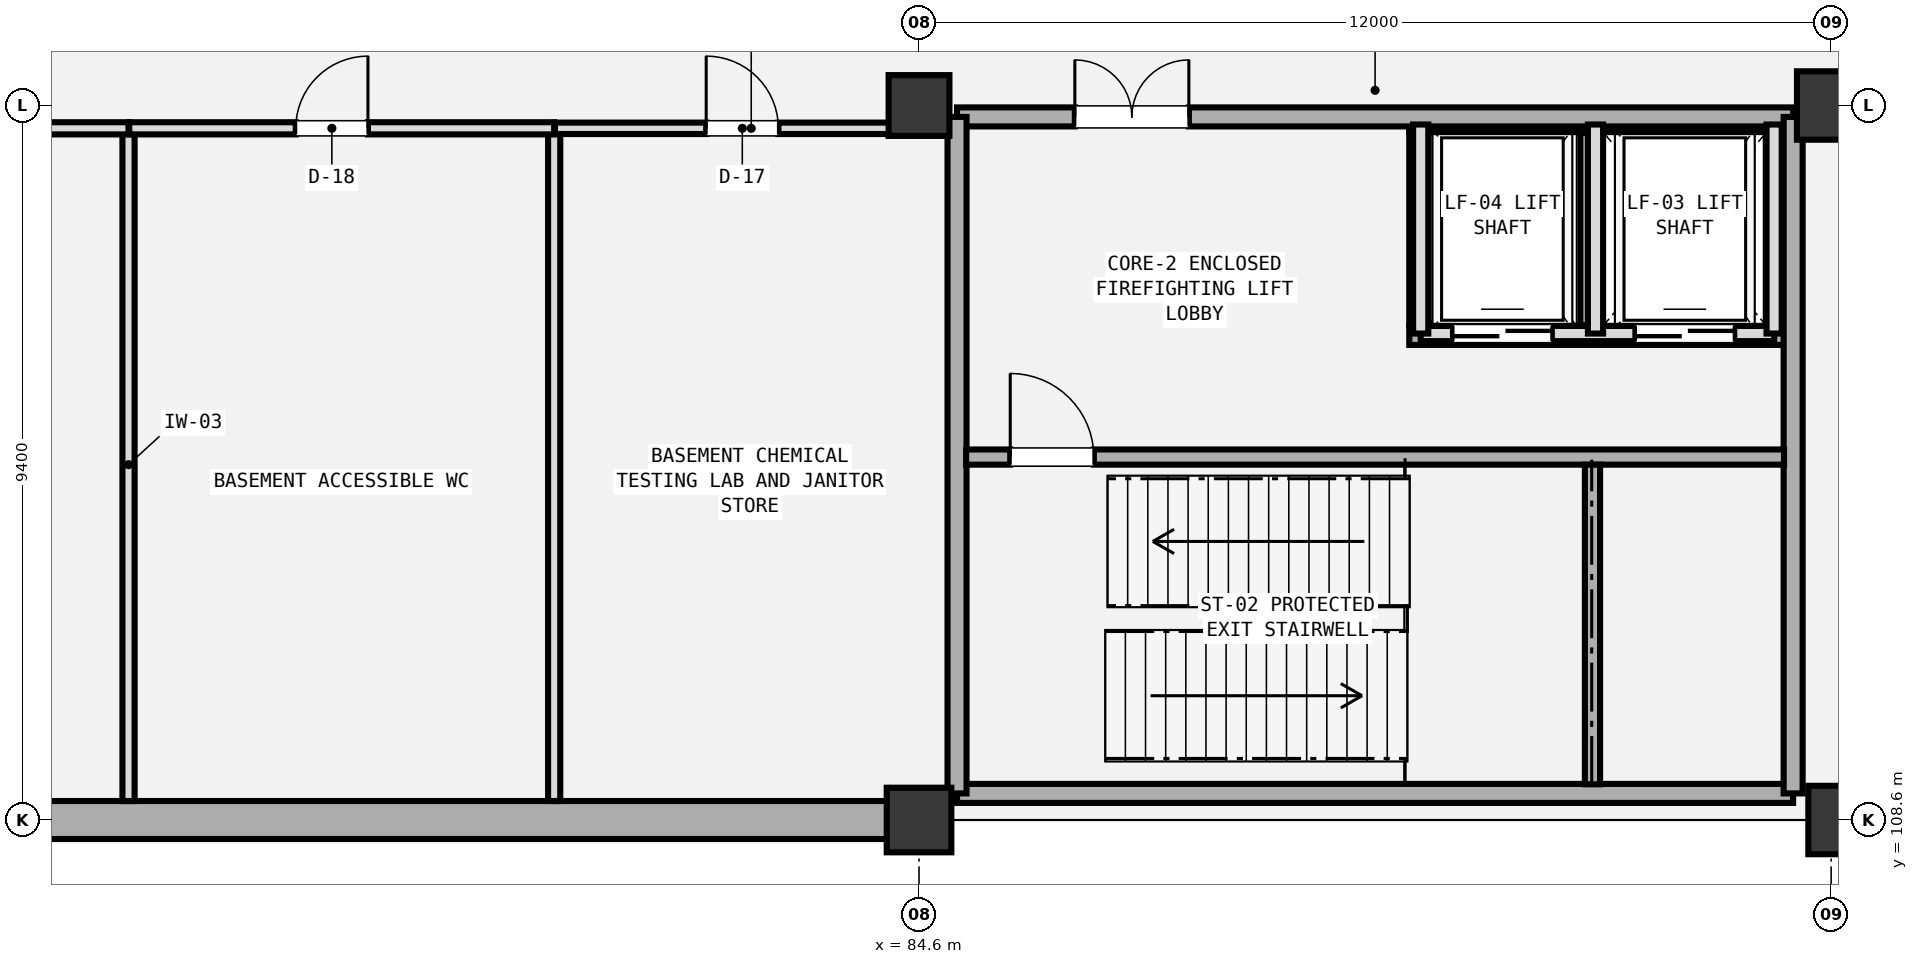
"""IFC4 building model, lengths in metres.
Left out: names, types, materials, properties, quantities, classifications, styles, units other than length and angle.
Written with IfcOpenShell. Run it as: python <this file> out.ifc"""

import sys

from ifc_helpers import new_model, si_unit, direction, frame, frame_2d, origin, origin_2d, place, context, subcontext, project, spatial, rectangle, extrude, element, fill, save


model = new_model("IFC4")
c1 = context("Model", 3, precision=1e-05, world=origin(), true_north=direction((0.0, 1.0)))
c2 = subcontext(c1, "Body", "Model", "MODEL_VIEW")
j1 = project(units=[si_unit("LENGTHUNIT", "METRE"), si_unit("PLANEANGLEUNIT", "RADIAN")], contexts=[c1])
p1 = place(None, origin())
s1 = spatial("IfcSite", under=j1, at=p1, CompositionType="ELEMENT")
p2 = place(p1, origin())
s2 = spatial("IfcBuilding", under=s1, at=p2, CompositionType="ELEMENT")
p3 = place(p2, frame((0.0, 0.0, -5.4)))
s3 = spatial("IfcBuildingStorey", under=s2, at=p3, CompositionType="ELEMENT", Elevation=-5.4)
for number, where, z_axis, x_axis in (
    (1, (91.05, 114.975, -1.6), (0.0, 0.0, 1.0), (1.0, 0.0, 0.0)),
    (2, (91.05, 117.775, -1.6), (0.0, 0.0, 1.0), (1.0, 0.0, 0.0)),
):
    element("IfcWall", number, at=place(p3, frame(where, z_axis=z_axis, x_axis=x_axis)), inside=s3, PredefinedType="SHEAR", context=c2, shape_type="SweptSolid", body=[
        extrude(rectangle(XDim=4.93, YDim=0.25, at=frame_2d((2.465, 0.0))), origin(), (0.0, 0.0, 1.0), 1.05),
    ])
for number, where, z_axis, x_axis in (
    (3, (91.175, 115.11, -1.6), (0.0, 0.0, 1.0), (0.0, 1.0, 0.0)),
    (4, (95.865, 115.11, -1.6), (0.0, 0.0, 1.0), (0.0, 1.0, 0.0)),
    (5, (93.425, 115.11, -1.6), (0.0, 0.0, 1.0), (0.0, 1.0, 0.0)),
):
    element("IfcWall", number, at=place(p3, frame(where, z_axis=z_axis, x_axis=x_axis)), inside=s3, PredefinedType="SHEAR", context=c2, shape_type="SweptSolid", body=[
        extrude(rectangle(XDim=2.53, YDim=0.25, at=frame_2d((1.265, 0.0))), origin(), (0.0, 0.0, 1.0), 1.05),
    ])
p4 = place(p3, frame((60.6, 108.6, 0.0), z_axis=(0.0, 0.0, 1.0), x_axis=(1.0, 0.0, 0.0)))
e6 = element("IfcWall", 6, at=p4, inside=s3, PredefinedType="USERDEFINED", context=c2, shape_type="SweptSolid", body=[
    extrude(rectangle(XDim=24.2, YDim=0.5, at=frame_2d((12.1, 0.0))), origin(), (0.0, 0.0, 1.0), 4.98),
])
p5 = place(p3, frame((96.4, 108.6, 0.0), z_axis=(0.0, 0.0, 1.0), x_axis=(1.0, 0.0, 0.0)))
e7 = element("IfcWall", 7, at=p5, inside=s3, PredefinedType="USERDEFINED", context=c2, shape_type="SweptSolid", body=[
    extrude(rectangle(XDim=59.6, YDim=0.5, at=frame_2d((29.8, 0.0))), origin(), (0.0, 0.0, 1.0), 4.98),
])
p6 = place(p3, frame((84.6, 108.6, -0.55), z_axis=(0.0, 0.0, 1.0), x_axis=(1.0, 0.0, 0.0)))
e8 = element("IfcColumn", 8, at=p6, inside=s3, PredefinedType="COLUMN", context=c2, shape_type="SweptSolid", body=[
    extrude(rectangle(XDim=0.85, YDim=0.85, at=origin_2d()), origin(), (0.0, 0.0, 1.0), 5.95),
])
p7 = place(p3, frame((84.6, 118.0, -0.55), z_axis=(0.0, 0.0, 1.0), x_axis=(1.0, 0.0, 0.0)))
e9 = element("IfcColumn", 9, at=p7, inside=s3, PredefinedType="COLUMN", context=c2, shape_type="SweptSolid", body=[
    extrude(rectangle(XDim=0.8, YDim=0.8, at=origin_2d()), origin(), (0.0, 0.0, 1.0), 5.95),
])
p8 = place(p3, frame((96.6, 108.6, -0.55), z_axis=(0.0, 0.0, 1.0), x_axis=(1.0, 0.0, 0.0)))
e10 = element("IfcColumn", 10, at=p8, inside=s3, PredefinedType="COLUMN", context=c2, shape_type="SweptSolid", body=[
    extrude(rectangle(XDim=0.6, YDim=0.9, at=origin_2d()), origin(), (0.0, 0.0, 1.0), 5.95),
])
p9 = place(p3, frame((96.6, 118.0, -0.55), z_axis=(0.0, 0.0, 1.0), x_axis=(1.0, 0.0, 0.0)))
e11 = element("IfcColumn", 11, at=p9, inside=s3, PredefinedType="COLUMN", context=c2, shape_type="SweptSolid", body=[
    extrude(rectangle(XDim=0.9, YDim=0.9, at=origin_2d()), origin(), (0.0, 0.0, 1.0), 5.95),
])
p10 = place(p3, frame((85.1, 108.95, -0.15), z_axis=(0.0, 0.0, 1.0), x_axis=(1.0, 0.0, 0.0)))
e12 = element("IfcWall", 12, at=p10, inside=s3, PredefinedType="SHEAR", context=c2, shape_type="SweptSolid", body=[
    extrude(rectangle(XDim=11.0, YDim=0.25, at=frame_2d((5.5, 0.0))), origin(), (0.0, 0.0, 1.0), 5.13),
])
p11 = place(p3, frame((85.1, 117.85, -0.15), z_axis=(0.0, 0.0, 1.0), x_axis=(1.0, 0.0, 0.0)))
e13 = element("IfcWall", 13, at=p11, inside=s3, PredefinedType="SHEAR", context=c2, shape_type="SweptSolid", body=[
    extrude(rectangle(XDim=11.0, YDim=0.25, at=frame_2d((5.5, 0.0))), origin(), (0.0, 0.0, 1.0), 5.13),
])
p12 = place(p11, frame((1.55, 0.0, 0.15)))
e14 = element("IfcOpeningElement", 14, at=p12, cuts=e13, PredefinedType="OPENING", context=c2, shape_type="SweptSolid", body=[
    extrude(rectangle(XDim=1.5, YDim=2.2, at=frame_2d((0.75, 1.1))), frame((0.0, 0.135, 0.0), z_axis=(0.0, -1.0, 0.0), x_axis=(1.0, 0.0, 0.0)), (0.0, 0.0, 1.0), 0.27),
])
for number, where, z_axis, x_axis in (
    (15, (85.1, 108.95, -0.15), (0.0, 0.0, 1.0), (0.0, 1.0, 0.0)),
    (16, (96.1, 108.95, -0.15), (0.0, 0.0, 1.0), (0.0, 1.0, 0.0)),
):
    element("IfcWall", number, at=place(p3, frame(where, z_axis=z_axis, x_axis=x_axis)), inside=s3, PredefinedType="SHEAR", context=c2, shape_type="SweptSolid", body=[
        extrude(rectangle(XDim=8.9, YDim=0.25, at=frame_2d((4.45, 0.0))), origin(), (0.0, 0.0, 1.0), 5.13),
    ])
p13 = place(p3, frame((85.22, 113.375, -0.15), z_axis=(0.0, 0.0, 1.0), x_axis=(1.0, 0.0, 0.0)))
e17 = element("IfcWall", 17, at=p13, inside=s3, PredefinedType="SHEAR", context=c2, shape_type="SweptSolid", body=[
    extrude(rectangle(XDim=10.76, YDim=0.2, at=frame_2d((5.38, 0.0))), origin(), (0.0, 0.0, 1.0), 5.13),
])
p14 = place(p13, frame((0.58, 0.0, 0.15)))
e18 = element("IfcOpeningElement", 18, at=p14, cuts=e17, PredefinedType="OPENING", context=c2, shape_type="SweptSolid", body=[
    extrude(rectangle(XDim=1.1, YDim=2.2, at=frame_2d((0.55, 1.1))), frame((0.0, 0.11, 0.0), z_axis=(0.0, -1.0, 0.0), x_axis=(1.0, 0.0, 0.0)), (0.0, 0.0, 1.0), 0.22),
])
p15 = place(p3, frame((93.46, 109.07, -0.15), z_axis=(0.0, 0.0, 1.0), x_axis=(0.0, 1.0, 0.0)))
e19 = element("IfcWall", 19, at=p15, inside=s3, PredefinedType="SHEAR", context=c2, shape_type="SweptSolid", body=[
    extrude(rectangle(XDim=4.205, YDim=0.2, at=frame_2d((2.103, 0.0))), origin(), (0.0, 0.0, 1.0), 5.13),
])
p16 = place(p3, frame((91.2, 115.0, -0.15), z_axis=(0.0, 0.0, 1.0), x_axis=(1.0, 0.0, 0.0)))
e20 = element("IfcWall", 20, at=p16, inside=s3, PredefinedType="SOLIDWALL", context=c2, shape_type="SweptSolid", body=[
    extrude(rectangle(XDim=4.65, YDim=0.2, at=frame_2d((2.325, 0.0))), origin(), (0.0, 0.0, 1.0), 4.93),
])
p17 = place(p16, frame((2.825, 0.0, 0.15)))
e21 = element("IfcOpeningElement", 21, at=p17, cuts=e20, PredefinedType="OPENING", context=c2, shape_type="SweptSolid", body=[
    extrude(rectangle(XDim=1.3, YDim=2.3, at=frame_2d((0.65, 1.15))), frame((0.0, 0.11, 0.0), z_axis=(0.0, -1.0, 0.0), x_axis=(1.0, 0.0, 0.0)), (0.0, 0.0, 1.0), 0.22),
])
p18 = place(p16, frame((0.425, 0.0, 0.15)))
e22 = element("IfcOpeningElement", 22, at=p18, cuts=e20, PredefinedType="OPENING", context=c2, shape_type="SweptSolid", body=[
    extrude(rectangle(XDim=1.3, YDim=2.3, at=frame_2d((0.65, 1.15))), frame((0.0, 0.11, 0.0), z_axis=(0.0, -1.0, 0.0), x_axis=(1.0, 0.0, 0.0)), (0.0, 0.0, 1.0), 0.22),
])
for number, where, z_axis, x_axis in (
    (23, (93.5, 115.0, -0.15), (0.0, 0.0, 1.0), (0.0, 1.0, 0.0)),
    (24, (95.85, 115.0, -0.15), (0.0, 0.0, 1.0), (0.0, 1.0, 0.0)),
    (25, (91.2, 115.0, -0.15), (0.0, 0.0, 1.0), (0.0, 1.0, 0.0)),
):
    element("IfcWall", number, at=place(p3, frame(where, z_axis=z_axis, x_axis=x_axis)), inside=s3, PredefinedType="SOLIDWALL", context=c2, shape_type="SweptSolid", body=[
        extrude(rectangle(XDim=2.75, YDim=0.2, at=frame_2d((1.375, 0.0))), origin(), (0.0, 0.0, 1.0), 5.13),
    ])
p19 = place(p3, frame((74.2, 108.85, 0.0), z_axis=(0.0, 0.0, 1.0), x_axis=(0.0, 1.0, 0.0)))
e26 = element("IfcWall", 26, at=p19, inside=s3, PredefinedType="PLUMBINGWALL", context=c2, shape_type="SweptSolid", body=[
    extrude(rectangle(XDim=8.85, YDim=0.16, at=frame_2d((4.425, 0.0))), origin(), (0.0, 0.0, 1.0), 3.8),
])
p20 = place(p3, frame((67.21, 117.7, 0.0), z_axis=(0.0, 0.0, 1.0), x_axis=(1.0, 0.0, 0.0)))
e27 = element("IfcWall", 27, at=p20, inside=s3, PredefinedType="PLUMBINGWALL", context=c2, shape_type="SweptSolid", body=[
    extrude(rectangle(XDim=6.99, YDim=0.16, at=frame_2d((3.495, 0.0))), origin(), (0.0, 0.0, 1.0), 3.8),
])
p21 = place(p20, frame((2.79, 0.0, 0.0)))
e28 = element("IfcOpeningElement", 28, at=p21, cuts=e27, PredefinedType="OPENING", context=c2, shape_type="SweptSolid", body=[
    extrude(rectangle(XDim=0.95, YDim=2.15, at=frame_2d((0.475, 1.075))), frame((0.0, 0.09, 0.0), z_axis=(0.0, -1.0, 0.0), x_axis=(1.0, 0.0, 0.0)), (0.0, 0.0, 1.0), 0.18),
])
p22 = place(p3, frame((79.8, 108.85, 0.0), z_axis=(0.0, 0.0, 1.0), x_axis=(0.0, 1.0, 0.0)))
e29 = element("IfcWall", 29, at=p22, inside=s3, PredefinedType="PLUMBINGWALL", context=c2, shape_type="SweptSolid", body=[
    extrude(rectangle(XDim=8.85, YDim=0.16, at=frame_2d((4.425, 0.0))), origin(), (0.0, 0.0, 1.0), 3.8),
])
p23 = place(p3, frame((74.21, 117.7, 0.0), z_axis=(0.0, 0.0, 1.0), x_axis=(1.0, 0.0, 0.0)))
e30 = element("IfcWall", 30, at=p23, inside=s3, PredefinedType="PLUMBINGWALL", context=c2, shape_type="SweptSolid", body=[
    extrude(rectangle(XDim=5.59, YDim=0.16, at=frame_2d((2.795, 0.0))), origin(), (0.0, 0.0, 1.0), 3.8),
])
p24 = place(p23, frame((2.19, 0.0, 0.0)))
e31 = element("IfcOpeningElement", 31, at=p24, cuts=e30, PredefinedType="OPENING", context=c2, shape_type="SweptSolid", body=[
    extrude(rectangle(XDim=0.95, YDim=2.15, at=frame_2d((0.475, 1.075))), frame((0.0, 0.09, 0.0), z_axis=(0.0, -1.0, 0.0), x_axis=(1.0, 0.0, 0.0)), (0.0, 0.0, 1.0), 0.18),
])
p25 = place(p3, frame((79.81, 117.7, 0.0), z_axis=(0.0, 0.0, 1.0), x_axis=(1.0, 0.0, 0.0)))
e32 = element("IfcWall", 32, at=p25, inside=s3, PredefinedType="PARTITIONING", context=c2, shape_type="SweptSolid", body=[
    extrude(rectangle(XDim=5.165, YDim=0.15, at=frame_2d((2.583, 0.0))), origin(), (0.0, 0.0, 1.0), 3.8),
])
p26 = place(p25, frame((1.99, 0.0, 0.0)))
e33 = element("IfcOpeningElement", 33, at=p26, cuts=e32, PredefinedType="OPENING", context=c2, shape_type="SweptSolid", body=[
    extrude(rectangle(XDim=0.95, YDim=2.2, at=frame_2d((0.475, 1.1))), frame((0.0, 0.085, 0.0), z_axis=(0.0, -1.0, 0.0), x_axis=(1.0, 0.0, 0.0)), (0.0, 0.0, 1.0), 0.17),
])
p27 = place(p12, origin())
e34 = element("IfcDoor", 34, at=p27, inside=s3, OperationType="DOUBLE_DOOR_SINGLE_SWING", PredefinedType="DOOR", context=c2, shape_type="SweptSolid", body=[
    extrude(rectangle(XDim=1.5, YDim=2.2, at=frame_2d((0.75, 1.1))), frame((0.0, 0.025, 0.0), z_axis=(0.0, -1.0, 0.0), x_axis=(1.0, 0.0, 0.0)), (0.0, 0.0, 1.0), 0.05),
])
fill(e14, e34)
p28 = place(p14, origin())
e35 = element("IfcDoor", 35, at=p28, inside=s3, OperationType="SINGLE_SWING_LEFT", PredefinedType="DOOR", context=c2, shape_type="SweptSolid", body=[
    extrude(rectangle(XDim=1.1, YDim=2.2, at=frame_2d((0.55, 1.1))), frame((0.0, 0.025, 0.0), z_axis=(0.0, -1.0, 0.0), x_axis=(1.0, 0.0, 0.0)), (0.0, 0.0, 1.0), 0.05),
])
fill(e18, e35)
p29 = place(p17, frame((1.3, 0.0, 0.0), z_axis=(0.0, 0.0, 1.0), x_axis=(-1.0, 0.0, 0.0)))
e36 = element("IfcDoor", 36, at=p29, inside=s3, OperationType="DOUBLE_DOOR_SLIDING", PredefinedType="DOOR", context=c2, shape_type="SweptSolid", body=[
    extrude(rectangle(XDim=1.3, YDim=2.3, at=frame_2d((0.65, 1.15))), frame((0.0, 0.025, 0.0), z_axis=(0.0, -1.0, 0.0), x_axis=(1.0, 0.0, 0.0)), (0.0, 0.0, 1.0), 0.05),
])
fill(e21, e36)
p30 = place(p18, frame((1.3, 0.0, 0.0), z_axis=(0.0, 0.0, 1.0), x_axis=(-1.0, 0.0, 0.0)))
e37 = element("IfcDoor", 37, at=p30, inside=s3, OperationType="DOUBLE_DOOR_SLIDING", PredefinedType="DOOR", context=c2, shape_type="SweptSolid", body=[
    extrude(rectangle(XDim=1.3, YDim=2.3, at=frame_2d((0.65, 1.15))), frame((0.0, 0.025, 0.0), z_axis=(0.0, -1.0, 0.0), x_axis=(1.0, 0.0, 0.0)), (0.0, 0.0, 1.0), 0.05),
])
fill(e22, e37)
p31 = place(p24, origin())
e38 = element("IfcDoor", 38, at=p31, inside=s3, OperationType="SINGLE_SWING_RIGHT", PredefinedType="DOOR", context=c2, shape_type="SweptSolid", body=[
    extrude(rectangle(XDim=0.95, YDim=2.15, at=frame_2d((0.475, 1.075))), frame((0.0, 0.025, 0.0), z_axis=(0.0, -1.0, 0.0), x_axis=(1.0, 0.0, 0.0)), (0.0, 0.0, 1.0), 0.05),
])
fill(e31, e38)
p32 = place(p26, origin())
e39 = element("IfcDoor", 39, at=p32, inside=s3, OperationType="SINGLE_SWING_LEFT", PredefinedType="DOOR", context=c2, shape_type="SweptSolid", body=[
    extrude(rectangle(XDim=0.95, YDim=2.2, at=frame_2d((0.475, 1.1))), frame((0.0, 0.025, 0.0), z_axis=(0.0, -1.0, 0.0), x_axis=(1.0, 0.0, 0.0)), (0.0, 0.0, 1.0), 0.05),
])
fill(e33, e39)
save(model, sys.argv[1])
